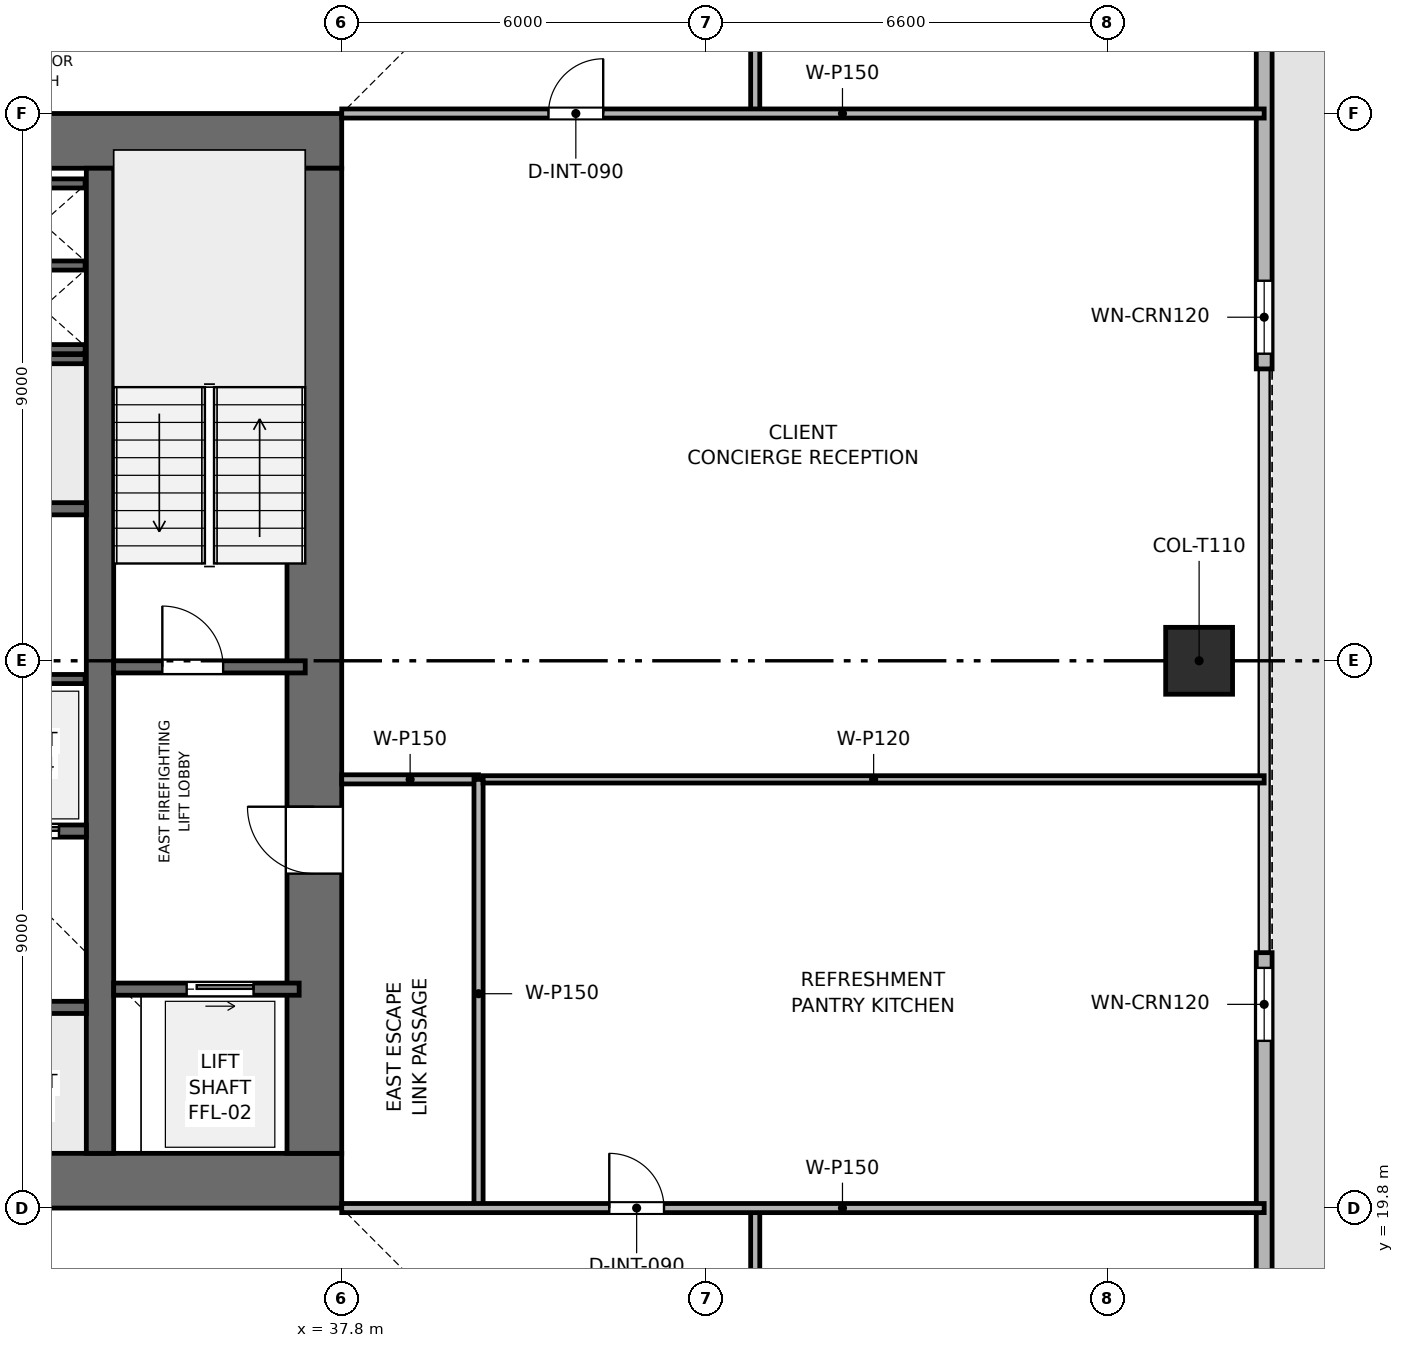
"""IFC4 building model, lengths in metres.
Left out: names, types, materials, properties, quantities, classifications, styles, units other than length and angle.
Written with IfcOpenShell. Run it as: python <this file> out.ifc"""

import sys

from ifc_helpers import new_model, si_unit, direction, frame, frame_2d, origin, origin_2d, place, context, subcontext, project, spatial, rectangle, extrude, element, fill, save


model = new_model("IFC4")
c1 = context("Model", 3, precision=1e-05, world=origin(), true_north=direction((0.0, 1.0)))
c2 = subcontext(c1, "Body", "Model", "MODEL_VIEW")
j1 = project(units=[si_unit("LENGTHUNIT", "METRE"), si_unit("PLANEANGLEUNIT", "RADIAN")], contexts=[c1])
p1 = place(None, origin())
s1 = spatial("IfcSite", under=j1, at=p1, CompositionType="ELEMENT")
p2 = place(p1, origin())
s2 = spatial("IfcBuilding", under=s1, at=p2, CompositionType="ELEMENT")
p3 = place(p2, frame((0.0, 0.0, 138.3)))
s3 = spatial("IfcBuildingStorey", under=s2, at=p3, CompositionType="ELEMENT", Elevation=138.3)
p4 = place(p3, frame((19.8, 20.25, 0.0), z_axis=(0.0, 0.0, 1.0), x_axis=(1.0, 0.0, 0.0)))
e1 = element("IfcWall", 1, at=p4, inside=s3, PredefinedType="SHEAR", context=c2, shape_type="SweptSolid", body=[
    extrude(rectangle(XDim=18.0, YDim=0.9, at=frame_2d((9.0, 0.0))), origin(), (0.0, 0.0, 1.0), 3.75),
])
p5 = place(p4, frame((8.4, 0.0, 0.0)))
e2 = element("IfcOpeningElement", 2, at=p5, cuts=e1, PredefinedType="OPENING", context=c2, shape_type="SweptSolid", body=[
    extrude(rectangle(XDim=1.2, YDim=2.2, at=frame_2d((0.6, 1.1))), frame((0.0, 0.46, 0.0), z_axis=(0.0, -1.0, 0.0), x_axis=(1.0, 0.0, 0.0)), (0.0, 0.0, 1.0), 0.92),
])
p6 = place(p3, frame((19.8, 37.35, 0.0), z_axis=(0.0, 0.0, 1.0), x_axis=(1.0, 0.0, 0.0)))
e3 = element("IfcWall", 3, at=p6, inside=s3, PredefinedType="SHEAR", context=c2, shape_type="SweptSolid", body=[
    extrude(rectangle(XDim=18.0, YDim=0.9, at=frame_2d((9.0, 0.0))), origin(), (0.0, 0.0, 1.0), 3.75),
])
p7 = place(p6, frame((7.05, 0.0, 0.0)))
e4 = element("IfcOpeningElement", 4, at=p7, cuts=e3, PredefinedType="OPENING", context=c2, shape_type="SweptSolid", body=[
    extrude(rectangle(XDim=1.1, YDim=2.15, at=frame_2d((0.55, 1.075))), frame((0.0, 0.46, 0.0), z_axis=(0.0, -1.0, 0.0), x_axis=(1.0, 0.0, 0.0)), (0.0, 0.0, 1.0), 0.92),
])
p8 = place(p3, frame((37.35, 20.7, 0.0), z_axis=(0.0, 0.0, 1.0), x_axis=(0.0, 1.0, 0.0)))
e5 = element("IfcWall", 5, at=p8, inside=s3, PredefinedType="SHEAR", context=c2, shape_type="SweptSolid", body=[
    extrude(rectangle(XDim=16.2, YDim=0.9, at=frame_2d((8.1, 0.0))), origin(), (0.0, 0.0, 1.0), 3.75),
])
p9 = place(p8, frame((4.6, 0.0, 0.0)))
e6 = element("IfcOpeningElement", 6, at=p9, cuts=e5, PredefinedType="OPENING", context=c2, shape_type="SweptSolid", body=[
    extrude(rectangle(XDim=1.1, YDim=2.15, at=frame_2d((0.55, 1.075))), frame((0.0, 0.46, 0.0), z_axis=(0.0, -1.0, 0.0), x_axis=(1.0, 0.0, 0.0)), (0.0, 0.0, 1.0), 0.92),
])
p10 = place(p3, frame((33.825, 20.7, 0.0), z_axis=(0.0, 0.0, 1.0), x_axis=(0.0, 1.0, 0.0)))
e7 = element("IfcWall", 7, at=p10, inside=s3, PredefinedType="SHEAR", context=c2, shape_type="SweptSolid", body=[
    extrude(rectangle(XDim=16.2, YDim=0.45, at=frame_2d((8.1, 0.0))), origin(), (0.0, 0.0, 1.0), 3.75),
])
p11 = place(p3, frame((51.9, 28.8, 0.003), z_axis=(0.0, 0.0, 1.0), x_axis=(1.0, 0.0, 0.0)))
e8 = element("IfcColumn", 8, at=p11, inside=s3, PredefinedType="COLUMN", context=c2, shape_type="SweptSolid", body=[
    extrude(rectangle(XDim=1.1, YDim=1.1, at=origin_2d()), origin(), (0.0, 0.0, 1.0), 3.489),
])
p12 = place(p3, frame((52.97, 46.2, 0.0), z_axis=(0.0, 0.0, 1.0), x_axis=(0.0, -1.0, 0.0)))
e9 = element("IfcWall", 9, at=p12, inside=s3, PredefinedType="SOLIDWALL", context=c2, shape_type="SweptSolid", body=[
    extrude(rectangle(XDim=12.6, YDim=0.26, at=frame_2d((6.3, 0.0))), origin(), (0.0, 0.0, 1.0), 3.495),
])
p13 = place(p12, frame((11.15, 0.0, 0.9)))
e10 = element("IfcOpeningElement", 10, at=p13, cuts=e9, PredefinedType="OPENING", context=c2, shape_type="SweptSolid", body=[
    extrude(rectangle(XDim=1.2, YDim=2.1, at=frame_2d((0.6, 1.05))), frame((0.0, 0.14, 0.0), z_axis=(0.0, -1.0, 0.0), x_axis=(1.0, 0.0, 0.0)), (0.0, 0.0, 1.0), 0.28),
])
p14 = place(p3, frame((52.97, 24.0, 0.0), z_axis=(0.0, 0.0, 1.0), x_axis=(0.0, -1.0, 0.0)))
e11 = element("IfcWall", 11, at=p14, inside=s3, PredefinedType="SOLIDWALL", context=c2, shape_type="SweptSolid", body=[
    extrude(rectangle(XDim=12.6, YDim=0.26, at=frame_2d((6.3, 0.0))), origin(), (0.0, 0.0, 1.0), 3.495),
])
p15 = place(p14, frame((0.25, 0.0, 0.9)))
e12 = element("IfcOpeningElement", 12, at=p15, cuts=e11, PredefinedType="OPENING", context=c2, shape_type="SweptSolid", body=[
    extrude(rectangle(XDim=1.2, YDim=2.1, at=frame_2d((0.6, 1.05))), frame((0.0, 0.14, 0.0), z_axis=(0.0, -1.0, 0.0), x_axis=(1.0, 0.0, 0.0)), (0.0, 0.0, 1.0), 0.28),
])
p16 = place(p3, frame((34.05, 28.7, 0.0), z_axis=(0.0, 0.0, 1.0), x_axis=(1.0, 0.0, 0.0)))
e13 = element("IfcWall", 13, at=p16, inside=s3, PredefinedType="SHEAR", context=c2, shape_type="SweptSolid", body=[
    extrude(rectangle(XDim=3.15, YDim=0.2, at=frame_2d((1.575, 0.0))), origin(), (0.0, 0.0, 1.0), 3.495),
])
p17 = place(p16, frame((0.8, 0.0, 0.0)))
e14 = element("IfcOpeningElement", 14, at=p17, cuts=e13, PredefinedType="OPENING", context=c2, shape_type="SweptSolid", body=[
    extrude(rectangle(XDim=1.0, YDim=2.1, at=frame_2d((0.5, 1.05))), frame((0.0, 0.11, 0.0), z_axis=(0.0, -1.0, 0.0), x_axis=(1.0, 0.0, 0.0)), (0.0, 0.0, 1.0), 0.22),
])
for number, where, z_axis, x_axis in (
    (15, (32.25, 33.925, 0.0), (0.0, 0.0, 1.0), (1.0, 0.0, 0.0)),
    (16, (32.25, 35.3, 0.0), (0.0, 0.0, 1.0), (1.0, 0.0, 0.0)),
):
    element("IfcWall", number, at=place(p3, frame(where, z_axis=z_axis, x_axis=x_axis)), inside=s3, PredefinedType="SHEAR", context=c2, shape_type="SweptSolid", body=[
        extrude(rectangle(XDim=1.33, YDim=0.15, at=frame_2d((0.665, 0.0))), origin(), (0.0, 0.0, 1.0), 3.495),
    ])
p18 = place(p3, frame((34.05, 23.4, 0.0), z_axis=(0.0, 0.0, 1.0), x_axis=(1.0, 0.0, 0.0)))
e17 = element("IfcWall", 17, at=p18, inside=s3, PredefinedType="SHEAR", context=c2, shape_type="SweptSolid", body=[
    extrude(rectangle(XDim=3.05, YDim=0.2, at=frame_2d((1.525, 0.0))), origin(), (0.0, 0.0, 1.0), 3.495),
])
p19 = place(p18, frame((1.2, 0.0, 0.0)))
e18 = element("IfcOpeningElement", 18, at=p19, cuts=e17, PredefinedType="OPENING", context=c2, shape_type="SweptSolid", body=[
    extrude(rectangle(XDim=1.1, YDim=2.15, at=frame_2d((0.55, 1.075))), frame((0.0, 0.11, 0.0), z_axis=(0.0, -1.0, 0.0), x_axis=(1.0, 0.0, 0.0)), (0.0, 0.0, 1.0), 0.22),
])
p20 = place(p3, frame((31.6, 23.1, 0.0), z_axis=(0.0, 0.0, 1.0), x_axis=(1.0, 0.0, 0.0)))
e19 = element("IfcWall", 19, at=p20, inside=s3, PredefinedType="SHEAR", context=c2, shape_type="SweptSolid", body=[
    extrude(rectangle(XDim=2.0, YDim=0.2, at=frame_2d((1.0, 0.0))), origin(), (0.0, 0.0, 1.0), 3.495),
])
p21 = place(p3, frame((31.6, 26.0, 0.0), z_axis=(0.0, 0.0, 1.0), x_axis=(1.0, 0.0, 0.0)))
e20 = element("IfcWall", 20, at=p21, inside=s3, PredefinedType="SHEAR", context=c2, shape_type="SweptSolid", body=[
    extrude(rectangle(XDim=2.0, YDim=0.2, at=frame_2d((1.0, 0.0))), origin(), (0.0, 0.0, 1.0), 3.495),
])
p22 = place(p21, frame((0.45, 0.0, 0.0)))
e21 = element("IfcOpeningElement", 21, at=p22, cuts=e20, PredefinedType="OPENING", context=c2, shape_type="SweptSolid", body=[
    extrude(rectangle(XDim=1.1, YDim=2.15, at=frame_2d((0.55, 1.075))), frame((0.0, 0.11, 0.0), z_axis=(0.0, -1.0, 0.0), x_axis=(1.0, 0.0, 0.0)), (0.0, 0.0, 1.0), 0.22),
])
p23 = place(p3, frame((31.6, 31.3, 0.0), z_axis=(0.0, 0.0, 1.0), x_axis=(1.0, 0.0, 0.0)))
e22 = element("IfcWall", 22, at=p23, inside=s3, PredefinedType="SHEAR", context=c2, shape_type="SweptSolid", body=[
    extrude(rectangle(XDim=2.0, YDim=0.2, at=frame_2d((1.0, 0.0))), origin(), (0.0, 0.0, 1.0), 3.495),
])
p24 = place(p3, frame((32.25, 36.65, 0.0), z_axis=(0.0, 0.0, 1.0), x_axis=(1.0, 0.0, 0.0)))
e23 = element("IfcWall", 23, at=p24, inside=s3, PredefinedType="SHEAR", context=c2, shape_type="SweptSolid", body=[
    extrude(rectangle(XDim=1.33, YDim=0.15, at=frame_2d((0.665, 0.0))), origin(), (0.0, 0.0, 1.0), 3.495),
])
for number, where, z_axis, x_axis in (
    (24, (29.5, 28.5, 0.0), (0.0, 0.0, 1.0), (1.0, 0.0, 0.0)),
    (25, (29.5, 33.76, 0.0), (0.0, 0.0, 1.0), (1.0, 0.0, 0.0)),
):
    element("IfcWall", number, at=place(p3, frame(where, z_axis=z_axis, x_axis=x_axis)), inside=s3, PredefinedType="SHEAR", context=c2, shape_type="SweptSolid", body=[
        extrude(rectangle(XDim=4.08, YDim=0.15, at=frame_2d((2.04, 0.0))), origin(), (0.0, 0.0, 1.0), 3.495),
    ])
p25 = place(p3, frame((37.8, 26.85, 0.0), z_axis=(0.0, 0.0, 1.0), x_axis=(1.0, 0.0, 0.0)))
e26 = element("IfcWall", 26, at=p25, inside=s3, PredefinedType="PARTITIONING", context=c2, shape_type="SweptSolid", body=[
    extrude(rectangle(XDim=2.25, YDim=0.15, at=frame_2d((1.125, 0.0))), origin(), (0.0, 0.0, 1.0), 3.495),
])
p26 = place(p3, frame((40.05, 19.8, 0.0), z_axis=(0.0, 0.0, 1.0), x_axis=(0.0, 1.0, 0.0)))
e27 = element("IfcWall", 27, at=p26, inside=s3, PredefinedType="PARTITIONING", context=c2, shape_type="SweptSolid", body=[
    extrude(rectangle(XDim=7.05, YDim=0.15, at=frame_2d((3.525, 0.0))), origin(), (0.0, 0.0, 1.0), 3.03),
])
p27 = place(p3, frame((40.125, 26.85, 0.0), z_axis=(0.0, 0.0, 1.0), x_axis=(1.0, 0.0, 0.0)))
e28 = element("IfcWall", 28, at=p27, inside=s3, PredefinedType="PARTITIONING", context=c2, shape_type="SweptSolid", body=[
    extrude(rectangle(XDim=12.845, YDim=0.12, at=frame_2d((6.422, 0.0))), origin(), (0.0, 0.0, 1.0), 2.98),
])
p28 = place(p3, frame((44.6, 17.4, 0.0), z_axis=(0.0, 0.0, 1.0), x_axis=(0.0, 1.0, 0.0)))
e29 = element("IfcWall", 29, at=p28, inside=s3, PredefinedType="PARTITIONING", context=c2, shape_type="SweptSolid", body=[
    extrude(rectangle(XDim=2.4, YDim=0.15, at=frame_2d((1.2, 0.0))), origin(), (0.0, 0.0, 1.0), 3.495),
])
p29 = place(p3, frame((44.6, 37.8, 0.0), z_axis=(0.0, 0.0, 1.0), x_axis=(0.0, 1.0, 0.0)))
e30 = element("IfcWall", 30, at=p29, inside=s3, PredefinedType="PARTITIONING", context=c2, shape_type="SweptSolid", body=[
    extrude(rectangle(XDim=2.4, YDim=0.15, at=frame_2d((1.2, 0.0))), origin(), (0.0, 0.0, 1.0), 3.495),
])
p30 = place(p3, frame((37.8, 19.8, 0.0), z_axis=(0.0, 0.0, 1.0), x_axis=(1.0, 0.0, 0.0)))
e31 = element("IfcWall", 31, at=p30, inside=s3, PredefinedType="PARTITIONING", context=c2, shape_type="SweptSolid", body=[
    extrude(rectangle(XDim=15.17, YDim=0.15, at=frame_2d((7.585, 0.0))), origin(), (0.0, 0.0, 1.0), 2.98),
])
p31 = place(p30, frame((4.4, 0.0, 0.0)))
e32 = element("IfcOpeningElement", 32, at=p31, cuts=e31, PredefinedType="OPENING", context=c2, shape_type="SweptSolid", body=[
    extrude(rectangle(XDim=0.9, YDim=2.1, at=frame_2d((0.45, 1.05))), frame((0.0, 0.085, 0.0), z_axis=(0.0, -1.0, 0.0), x_axis=(1.0, 0.0, 0.0)), (0.0, 0.0, 1.0), 0.17),
])
p32 = place(p3, frame((37.8, 37.8, 0.0), z_axis=(0.0, 0.0, 1.0), x_axis=(1.0, 0.0, 0.0)))
e33 = element("IfcWall", 33, at=p32, inside=s3, PredefinedType="PARTITIONING", context=c2, shape_type="SweptSolid", body=[
    extrude(rectangle(XDim=15.17, YDim=0.15, at=frame_2d((7.585, 0.0))), origin(), (0.0, 0.0, 1.0), 2.98),
])
p33 = place(p32, frame((3.4, 0.0, 0.0)))
e34 = element("IfcOpeningElement", 34, at=p33, cuts=e33, PredefinedType="OPENING", context=c2, shape_type="SweptSolid", body=[
    extrude(rectangle(XDim=0.9, YDim=2.1, at=frame_2d((0.45, 1.05))), frame((0.0, 0.085, 0.0), z_axis=(0.0, -1.0, 0.0), x_axis=(1.0, 0.0, 0.0)), (0.0, 0.0, 1.0), 0.17),
])
p34 = place(p13, origin())
e35 = element("IfcWindow", 35, at=p34, inside=s3, PartitioningType="SINGLE_PANEL", PredefinedType="WINDOW", context=c2, shape_type="SweptSolid", body=[
    extrude(rectangle(XDim=1.2, YDim=2.1, at=frame_2d((0.6, 1.05))), frame((0.0, 0.03, 0.0), z_axis=(0.0, -1.0, 0.0), x_axis=(1.0, 0.0, 0.0)), (0.0, 0.0, 1.0), 0.06),
])
fill(e10, e35)
p35 = place(p15, origin())
e36 = element("IfcWindow", 36, at=p35, inside=s3, PartitioningType="SINGLE_PANEL", PredefinedType="WINDOW", context=c2, shape_type="SweptSolid", body=[
    extrude(rectangle(XDim=1.2, YDim=2.1, at=frame_2d((0.6, 1.05))), frame((0.0, 0.03, 0.0), z_axis=(0.0, -1.0, 0.0), x_axis=(1.0, 0.0, 0.0)), (0.0, 0.0, 1.0), 0.06),
])
fill(e12, e36)
p36 = place(p17, origin())
e37 = element("IfcDoor", 37, at=p36, inside=s3, OperationType="SINGLE_SWING_LEFT", PredefinedType="DOOR", context=c2, shape_type="SweptSolid", body=[
    extrude(rectangle(XDim=1.0, YDim=2.1, at=frame_2d((0.5, 1.05))), frame((0.0, 0.025, 0.0), z_axis=(0.0, -1.0, 0.0), x_axis=(1.0, 0.0, 0.0)), (0.0, 0.0, 1.0), 0.05),
])
fill(e14, e37)
p37 = place(p19, origin())
e38 = element("IfcDoor", 38, at=p37, inside=s3, OperationType="SLIDING_TO_RIGHT", PredefinedType="DOOR", context=c2, shape_type="SweptSolid", body=[
    extrude(rectangle(XDim=1.1, YDim=2.15, at=frame_2d((0.55, 1.075))), frame((0.0, 0.025, 0.0), z_axis=(0.0, -1.0, 0.0), x_axis=(1.0, 0.0, 0.0)), (0.0, 0.0, 1.0), 0.05),
])
fill(e18, e38)
p38 = place(p22, origin())
e39 = element("IfcDoor", 39, at=p38, inside=s3, OperationType="SLIDING_TO_RIGHT", PredefinedType="DOOR", context=c2, shape_type="SweptSolid", body=[
    extrude(rectangle(XDim=1.1, YDim=2.15, at=frame_2d((0.55, 1.075))), frame((0.0, 0.025, 0.0), z_axis=(0.0, -1.0, 0.0), x_axis=(1.0, 0.0, 0.0)), (0.0, 0.0, 1.0), 0.05),
])
fill(e21, e39)
p39 = place(p31, origin())
e40 = element("IfcDoor", 40, at=p39, inside=s3, OperationType="SINGLE_SWING_LEFT", PredefinedType="DOOR", context=c2, shape_type="SweptSolid", body=[
    extrude(rectangle(XDim=0.9, YDim=2.1, at=frame_2d((0.45, 1.05))), frame((0.0, 0.025, 0.0), z_axis=(0.0, -1.0, 0.0), x_axis=(1.0, 0.0, 0.0)), (0.0, 0.0, 1.0), 0.05),
])
fill(e32, e40)
p40 = place(p33, origin())
e41 = element("IfcDoor", 41, at=p40, inside=s3, OperationType="SINGLE_SWING_RIGHT", PredefinedType="DOOR", context=c2, shape_type="SweptSolid", body=[
    extrude(rectangle(XDim=0.9, YDim=2.1, at=frame_2d((0.45, 1.05))), frame((0.0, 0.025, 0.0), z_axis=(0.0, -1.0, 0.0), x_axis=(1.0, 0.0, 0.0)), (0.0, 0.0, 1.0), 0.05),
])
fill(e34, e41)
p41 = place(p9, origin())
e42 = element("IfcDoor", 42, at=p41, inside=s3, OperationType="SINGLE_SWING_RIGHT", PredefinedType="DOOR", context=c2, shape_type="SweptSolid", body=[
    extrude(rectangle(XDim=1.1, YDim=2.15, at=frame_2d((0.55, 1.075))), frame((0.0, 0.025, 0.0), z_axis=(0.0, -1.0, 0.0), x_axis=(1.0, 0.0, 0.0)), (0.0, 0.0, 1.0), 0.05),
])
fill(e6, e42)
save(model, sys.argv[1])
